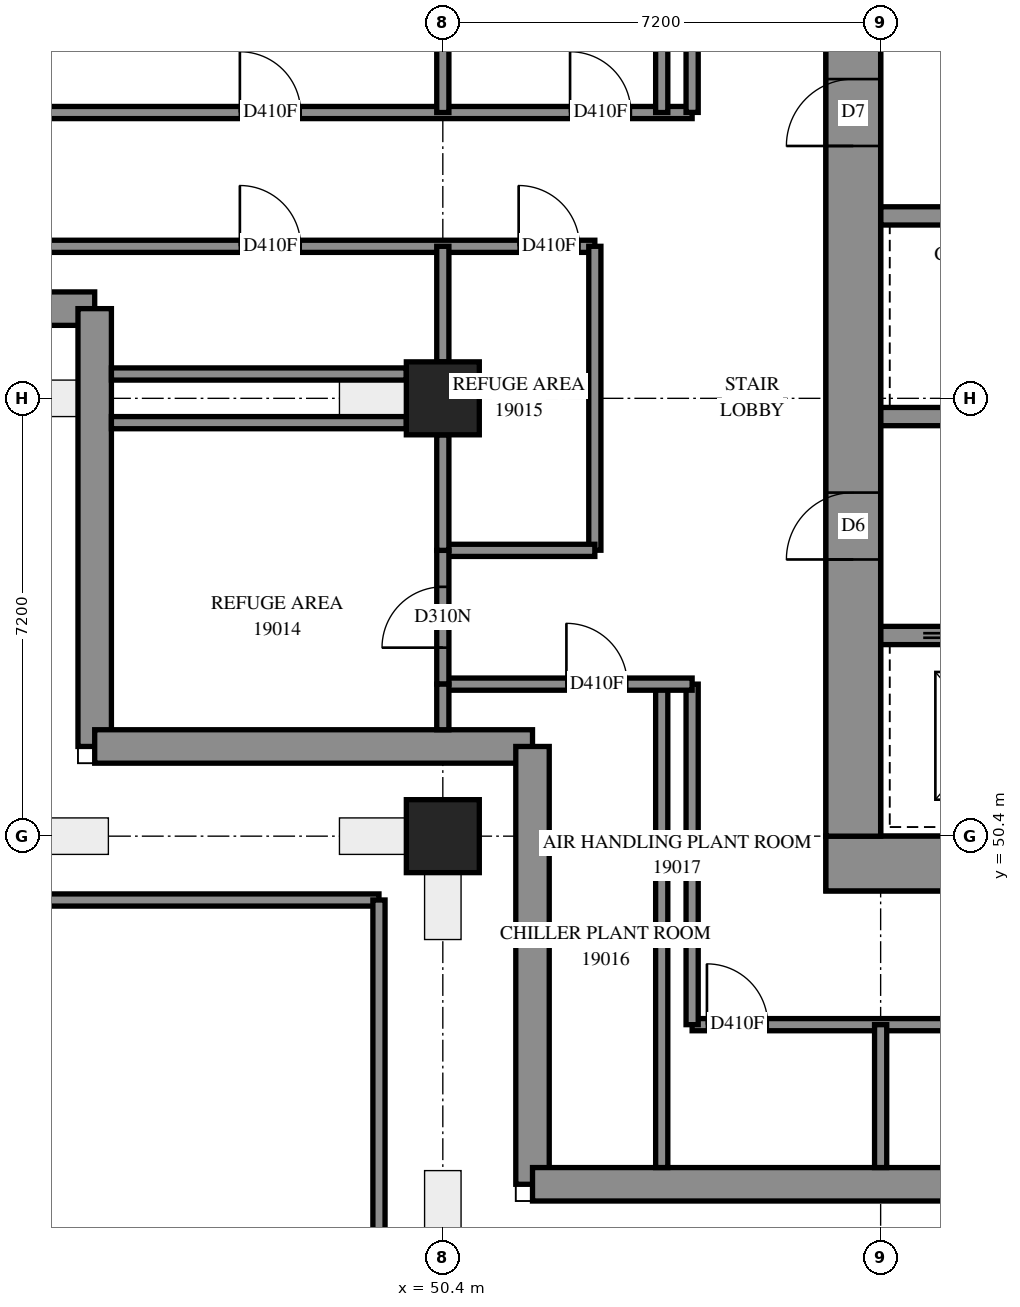
"""IFC4 building model, lengths in metres.
Left out: names, types, materials, properties, quantities, classifications, styles, units other than length and angle.
Written with IfcOpenShell. Run it as: python <this file> out.ifc"""

import sys

from ifc_helpers import new_model, si_unit, direction, frame, frame_2d, origin, origin_2d, place, context, subcontext, project, spatial, polyline, rectangle, outline, extrude, element, fill, save


model = new_model("IFC4")
c1 = context("Model", 3, precision=1e-05, world=origin(), true_north=direction((0.0, 1.0)))
c2 = subcontext(c1, "Body", "Model", "MODEL_VIEW")
j1 = project(units=[si_unit("LENGTHUNIT", "METRE"), si_unit("PLANEANGLEUNIT", "RADIAN")], contexts=[c1])
p1 = place(None, origin())
s1 = spatial("IfcSite", under=j1, at=p1, CompositionType="ELEMENT")
p2 = place(p1, origin())
s2 = spatial("IfcBuilding", under=s1, at=p2, CompositionType="ELEMENT")
p3 = place(p2, frame((0.0, 0.0, 72.0)))
s3 = spatial("IfcBuildingStorey", under=s2, at=p3, CompositionType="ELEMENT", Elevation=72.0)
p4 = place(p3, frame((50.4, 50.4, -0.3), z_axis=(0.0, 0.0, 1.0), x_axis=(1.0, 0.0, 0.0)))
e1 = element("IfcColumn", 1, at=p4, inside=s3, PredefinedType="COLUMN", context=c2, shape_type="SweptSolid", body=[
    extrude(rectangle(XDim=1.2, YDim=1.2, at=origin_2d()), origin(), (0.0, 0.0, 1.0), 5.0),
])
p5 = place(p3, frame((50.4, 57.6, 0.0), z_axis=(0.0, 0.0, 1.0), x_axis=(1.0, 0.0, 0.0)))
e2 = element("IfcColumn", 2, at=p5, inside=s3, PredefinedType="COLUMN", context=c2, shape_type="SweptSolid", body=[
    extrude(rectangle(XDim=1.2, YDim=1.2, at=origin_2d()), origin(), (0.0, 0.0, 1.0), 4.7),
])
p6 = place(p3, frame((56.7, 49.95, -0.3), z_axis=(0.0, 0.0, 1.0), x_axis=(1.0, 0.0, 0.0)))
e3 = element("IfcWall", 3, at=p6, inside=s3, PredefinedType="SHEAR", context=c2, shape_type="SweptSolid", body=[
    extrude(rectangle(XDim=16.2, YDim=0.9, at=frame_2d((8.1, 0.0))), origin(), (0.0, 0.0, 1.0), 4.3),
])
p7 = place(p3, frame((57.15, 50.4, -0.3), z_axis=(0.0, 0.0, 1.0), x_axis=(0.0, 1.0, 0.0)))
e4 = element("IfcWall", 4, at=p7, inside=s3, PredefinedType="SHEAR", context=c2, shape_type="SweptSolid", body=[
    extrude(rectangle(XDim=14.4, YDim=0.9, at=frame_2d((7.2, 0.0))), origin(), (0.0, 0.0, 1.0), 4.3),
])
p8 = place(p7, frame((4.55, 0.0, 0.3)))
e5 = element("IfcOpeningElement", 5, at=p8, cuts=e4, PredefinedType="OPENING", context=c2, shape_type="SweptSolid", body=[
    extrude(rectangle(XDim=1.1, YDim=2.1, at=frame_2d((0.55, 1.05))), frame((0.0, 0.46, 0.0), z_axis=(0.0, -1.0, 0.0), x_axis=(1.0, 0.0, 0.0)), (0.0, 0.0, 1.0), 0.92),
])
p9 = place(p7, frame((11.35, 0.0, 0.3)))
e6 = element("IfcOpeningElement", 6, at=p9, cuts=e4, PredefinedType="OPENING", context=c2, shape_type="SweptSolid", body=[
    extrude(rectangle(XDim=1.1, YDim=2.1, at=frame_2d((0.55, 1.05))), frame((0.0, 0.46, 0.0), z_axis=(0.0, -1.0, 0.0), x_axis=(1.0, 0.0, 0.0)), (0.0, 0.0, 1.0), 0.92),
])
p10 = place(p3, frame((57.6, 53.7, 0.0), z_axis=(0.0, 0.0, 1.0), x_axis=(1.0, 0.0, 0.0)))
e7 = element("IfcWall", 7, at=p10, inside=s3, PredefinedType="SOLIDWALL", context=c2, shape_type="SweptSolid", body=[
    extrude(rectangle(XDim=14.4, YDim=0.3, at=frame_2d((7.2, 0.0))), origin(), (0.0, 0.0, 1.0), 4.7),
])
p11 = place(p10, frame((1.25, 0.0, 0.0)))
e8 = element("IfcOpeningElement", 8, at=p11, cuts=e7, PredefinedType="OPENING", context=c2, shape_type="SweptSolid", body=[
    extrude(rectangle(XDim=1.1, YDim=2.1, at=frame_2d((0.55, 1.05))), frame((0.0, 0.16, 0.0), z_axis=(0.0, -1.0, 0.0), x_axis=(1.0, 0.0, 0.0)), (0.0, 0.0, 1.0), 0.32),
])
p12 = place(p10, frame((4.85, 0.0, 0.0)))
e9 = element("IfcOpeningElement", 9, at=p12, cuts=e7, PredefinedType="OPENING", context=c2, shape_type="SweptSolid", body=[
    extrude(rectangle(XDim=1.1, YDim=2.1, at=frame_2d((0.55, 1.05))), frame((0.0, 0.16, 0.0), z_axis=(0.0, -1.0, 0.0), x_axis=(1.0, 0.0, 0.0)), (0.0, 0.0, 1.0), 0.32),
])
p13 = place(p10, frame((8.45, 0.0, 0.0)))
e10 = element("IfcOpeningElement", 10, at=p13, cuts=e7, PredefinedType="OPENING", context=c2, shape_type="SweptSolid", body=[
    extrude(rectangle(XDim=1.1, YDim=2.1, at=frame_2d((0.55, 1.05))), frame((0.0, 0.16, 0.0), z_axis=(0.0, -1.0, 0.0), x_axis=(1.0, 0.0, 0.0)), (0.0, 0.0, 1.0), 0.32),
])
p14 = place(p10, frame((12.05, 0.0, 0.0)))
e11 = element("IfcOpeningElement", 11, at=p14, cuts=e7, PredefinedType="OPENING", context=c2, shape_type="SweptSolid", body=[
    extrude(rectangle(XDim=1.1, YDim=2.1, at=frame_2d((0.55, 1.05))), frame((0.0, 0.16, 0.0), z_axis=(0.0, -1.0, 0.0), x_axis=(1.0, 0.0, 0.0)), (0.0, 0.0, 1.0), 0.32),
])
p15 = place(p3, frame((57.6, 57.3, 0.0), z_axis=(0.0, 0.0, 1.0), x_axis=(1.0, 0.0, 0.0)))
e12 = element("IfcWall", 12, at=p15, inside=s3, PredefinedType="SOLIDWALL", context=c2, shape_type="SweptSolid", body=[
    extrude(rectangle(XDim=14.4, YDim=0.3, at=frame_2d((7.2, 0.0))), origin(), (0.0, 0.0, 1.0), 4.7),
])
p16 = place(p15, frame((12.05, 0.0, 0.0)))
e13 = element("IfcOpeningElement", 13, at=p16, cuts=e12, PredefinedType="OPENING", context=c2, shape_type="SweptSolid", body=[
    extrude(rectangle(XDim=1.1, YDim=2.1, at=frame_2d((0.55, 1.05))), frame((0.0, 0.16, 0.0), z_axis=(0.0, -1.0, 0.0), x_axis=(1.0, 0.0, 0.0)), (0.0, 0.0, 1.0), 0.32),
])
p17 = place(p3, frame((57.6, 60.6, 0.0), z_axis=(0.0, 0.0, 1.0), x_axis=(1.0, 0.0, 0.0)))
e14 = element("IfcWall", 14, at=p17, inside=s3, PredefinedType="SOLIDWALL", context=c2, shape_type="SweptSolid", body=[
    extrude(rectangle(XDim=7.2, YDim=0.3, at=frame_2d((3.6, 0.0))), origin(), (0.0, 0.0, 1.0), 4.7),
])
p18 = place(p3, frame((30.275, 59.075, 0.0), z_axis=(0.0, 0.0, 1.0), x_axis=(1.0, 0.0, 0.0)))
e15 = element("IfcWall", 15, at=p18, inside=s3, PredefinedType="SOLIDWALL", context=c2, shape_type="SweptSolid", body=[
    extrude(outline(polyline([(-0.275, -0.275), (14.125, -0.275), (14.675, 0.275), (0.275, 0.275), (-0.275, -0.275)])), origin(), (0.0, 0.0, 1.0), 4.7),
])
p19 = place(p3, frame((44.675, 59.075, 0.0), z_axis=(0.0, 0.0, 1.0), x_axis=(0.0, -1.0, 0.0)))
e16 = element("IfcWall", 16, at=p19, inside=s3, PredefinedType="SOLIDWALL", context=c2, shape_type="SweptSolid", body=[
    extrude(outline(polyline([(0.275, -0.275), (7.475, -0.275), (6.925, 0.275), (-0.275, 0.275), (0.275, -0.275)])), origin(), (0.0, 0.0, 1.0), 4.7),
])
p20 = place(p3, frame((44.675, 51.875, 0.0), z_axis=(0.0, 0.0, 1.0), x_axis=(1.0, 0.0, 0.0)))
e17 = element("IfcWall", 17, at=p20, inside=s3, PredefinedType="SOLIDWALL", context=c2, shape_type="SweptSolid", body=[
    extrude(outline(polyline([(-0.275, -0.275), (6.925, -0.275), (7.475, 0.275), (0.275, 0.275), (-0.275, -0.275)])), origin(), (0.0, 0.0, 1.0), 4.7),
])
p21 = place(p3, frame((51.875, 51.875, 0.0), z_axis=(0.0, 0.0, 1.0), x_axis=(0.0, -1.0, 0.0)))
e18 = element("IfcWall", 18, at=p21, inside=s3, PredefinedType="SOLIDWALL", context=c2, shape_type="SweptSolid", body=[
    extrude(outline(polyline([(0.275, -0.275), (7.475, -0.275), (6.925, 0.275), (-0.275, 0.275), (0.275, -0.275)])), origin(), (0.0, 0.0, 1.0), 4.7),
])
p22 = place(p3, frame((51.875, 44.675, 0.0), z_axis=(0.0, 0.0, 1.0), x_axis=(1.0, 0.0, 0.0)))
e19 = element("IfcWall", 19, at=p22, inside=s3, PredefinedType="SOLIDWALL", context=c2, shape_type="SweptSolid", body=[
    extrude(outline(polyline([(-0.275, -0.275), (26.075, -0.275), (26.303, 0.275), (0.275, 0.275), (-0.275, -0.275)])), origin(), (0.0, 0.0, 1.0), 4.7),
])
p23 = place(p22, frame((21.025, 0.0, 0.9)))
e20 = element("IfcOpeningElement", 20, at=p23, cuts=e19, PredefinedType="OPENING", context=c2, shape_type="SweptSolid", body=[
    extrude(rectangle(XDim=1.8, YDim=2.4, at=frame_2d((0.9, 1.2))), frame((0.0, 0.285, 0.0), z_axis=(0.0, -1.0, 0.0), x_axis=(1.0, 0.0, 0.0)), (0.0, 0.0, 1.0), 0.57),
])
p24 = place(p3, frame((42.15, 49.35, 0.0), z_axis=(0.0, 0.0, 1.0), x_axis=(1.0, 0.0, 0.0)))
e21 = element("IfcWall", 21, at=p24, inside=s3, PredefinedType="SOLIDWALL", context=c2, shape_type="SweptSolid", body=[
    extrude(outline(polyline([(-0.1, -0.1), (7.1, -0.1), (7.3, 0.1), (0.1, 0.1), (-0.1, -0.1)])), origin(), (0.0, 0.0, 1.0), 4.7),
])
p25 = place(p3, frame((49.35, 49.35, 0.0), z_axis=(0.0, 0.0, 1.0), x_axis=(0.0, -1.0, 0.0)))
e22 = element("IfcWall", 22, at=p25, inside=s3, PredefinedType="SOLIDWALL", context=c2, shape_type="SweptSolid", body=[
    extrude(outline(polyline([(0.1, -0.1), (7.3, -0.1), (7.1, 0.1), (-0.1, 0.1), (0.1, -0.1)])), origin(), (0.0, 0.0, 1.0), 4.7),
])
p26 = place(p3, frame((30.55, 60.1, 0.0), z_axis=(0.0, 0.0, 1.0), x_axis=(1.0, 0.0, 0.0)))
e23 = element("IfcWall", 23, at=p26, inside=s3, PredefinedType="PARTITIONING", context=c2, shape_type="SweptSolid", body=[
    extrude(rectangle(XDim=22.35, YDim=0.2, at=frame_2d((11.175, 0.0))), origin(), (0.0, 0.0, 1.0), 4.7),
])
p27 = place(p26, frame((16.512, 0.0, 0.0)))
e24 = element("IfcOpeningElement", 24, at=p27, cuts=e23, PredefinedType="OPENING", context=c2, shape_type="SweptSolid", body=[
    extrude(rectangle(XDim=1.0, YDim=2.1, at=frame_2d((0.5, 1.05))), frame((0.0, 0.11, 0.0), z_axis=(0.0, -1.0, 0.0), x_axis=(1.0, 0.0, 0.0)), (0.0, 0.0, 1.0), 0.22),
])
p28 = place(p26, frame((21.097, 0.0, 0.0)))
e25 = element("IfcOpeningElement", 25, at=p28, cuts=e23, PredefinedType="OPENING", context=c2, shape_type="SweptSolid", body=[
    extrude(rectangle(XDim=1.0, YDim=2.1, at=frame_2d((0.5, 1.05))), frame((0.0, 0.11, 0.0), z_axis=(0.0, -1.0, 0.0), x_axis=(1.0, 0.0, 0.0)), (0.0, 0.0, 1.0), 0.22),
])
p29 = place(p3, frame((33.502, 62.3, 0.0), z_axis=(0.0, 0.0, 1.0), x_axis=(1.0, 0.0, 0.0)))
e26 = element("IfcWall", 26, at=p29, inside=s3, PredefinedType="PARTITIONING", context=c2, shape_type="SweptSolid", body=[
    extrude(rectangle(XDim=20.998, YDim=0.2, at=frame_2d((10.499, 0.0))), origin(), (0.0, 0.0, 1.0), 4.7),
])
p30 = place(p29, frame((6.361, 0.0, 0.0)))
e27 = element("IfcOpeningElement", 27, at=p30, cuts=e26, PredefinedType="OPENING", context=c2, shape_type="SweptSolid", body=[
    extrude(rectangle(XDim=1.0, YDim=2.1, at=frame_2d((0.5, 1.05))), frame((0.0, 0.11, 0.0), z_axis=(0.0, -1.0, 0.0), x_axis=(1.0, 0.0, 0.0)), (0.0, 0.0, 1.0), 0.22),
])
p31 = place(p29, frame((13.56, 0.0, 0.0)))
e28 = element("IfcOpeningElement", 28, at=p31, cuts=e26, PredefinedType="OPENING", context=c2, shape_type="SweptSolid", body=[
    extrude(rectangle(XDim=1.0, YDim=2.1, at=frame_2d((0.5, 1.05))), frame((0.0, 0.11, 0.0), z_axis=(0.0, -1.0, 0.0), x_axis=(1.0, 0.0, 0.0)), (0.0, 0.0, 1.0), 0.22),
])
p32 = place(p29, frame((18.991, 0.0, 0.0)))
e29 = element("IfcOpeningElement", 29, at=p32, cuts=e26, PredefinedType="OPENING", context=c2, shape_type="SweptSolid", body=[
    extrude(rectangle(XDim=1.0, YDim=2.1, at=frame_2d((0.5, 1.05))), frame((0.0, 0.11, 0.0), z_axis=(0.0, -1.0, 0.0), x_axis=(1.0, 0.0, 0.0)), (0.0, 0.0, 1.0), 0.22),
])
p33 = place(p3, frame((54.5, 47.3, 0.0), z_axis=(0.0, 0.0, 1.0), x_axis=(1.0, 0.0, 0.0)))
e30 = element("IfcWall", 30, at=p33, inside=s3, PredefinedType="PARTITIONING", context=c2, shape_type="SweptSolid", body=[
    extrude(rectangle(XDim=19.56, YDim=0.2, at=frame_2d((9.78, 0.0))), origin(), (0.0, 0.0, 1.0), 4.7),
])
p34 = place(p33, frame((0.243, 0.0, 0.0)))
e31 = element("IfcOpeningElement", 31, at=p34, cuts=e30, PredefinedType="OPENING", context=c2, shape_type="SweptSolid", body=[
    extrude(rectangle(XDim=1.0, YDim=2.1, at=frame_2d((0.5, 1.05))), frame((0.0, 0.11, 0.0), z_axis=(0.0, -1.0, 0.0), x_axis=(1.0, 0.0, 0.0)), (0.0, 0.0, 1.0), 0.22),
])
p35 = place(p33, frame((12.457, 0.0, 0.0)))
e32 = element("IfcOpeningElement", 32, at=p35, cuts=e30, PredefinedType="OPENING", context=c2, shape_type="SweptSolid", body=[
    extrude(rectangle(XDim=1.0, YDim=2.1, at=frame_2d((0.5, 1.05))), frame((0.0, 0.11, 0.0), z_axis=(0.0, -1.0, 0.0), x_axis=(1.0, 0.0, 0.0)), (0.0, 0.0, 1.0), 0.22),
])
for number, where, z_axis, x_axis in (
    (33, (54.0, 44.95, 0.0), (0.0, 0.0, 1.0), (0.0, 1.0, 0.0)),
    (34, (54.0, 62.3, 0.0), (0.0, 0.0, 1.0), (0.0, 1.0, 0.0)),
):
    element("IfcWall", number, at=place(p3, frame(where, z_axis=z_axis, x_axis=x_axis)), inside=s3, PredefinedType="PARTITIONING", context=c2, shape_type="SweptSolid", body=[
        extrude(rectangle(XDim=7.95, YDim=0.2, at=frame_2d((3.975, 0.0))), origin(), (0.0, 0.0, 1.0), 4.7),
    ])
p36 = place(p3, frame((54.5, 47.3, 0.0), z_axis=(0.0, 0.0, 1.0), x_axis=(0.0, 1.0, 0.0)))
e35 = element("IfcWall", 35, at=p36, inside=s3, PredefinedType="PARTITIONING", context=c2, shape_type="SweptSolid", body=[
    extrude(rectangle(XDim=5.6, YDim=0.2, at=frame_2d((2.8, 0.0))), origin(), (0.0, 0.0, 1.0), 4.7),
])
p37 = place(p3, frame((54.5, 62.302, 0.0), z_axis=(0.0, 0.0, 1.0), x_axis=(0.0, 1.0, 0.0)))
e36 = element("IfcWall", 36, at=p37, inside=s3, PredefinedType="PARTITIONING", context=c2, shape_type="SweptSolid", body=[
    extrude(rectangle(XDim=5.598, YDim=0.2, at=frame_2d((2.799, 0.0))), origin(), (0.0, 0.0, 1.0), 4.7),
])
p38 = place(p3, frame((52.9, 55.102, 0.0), z_axis=(0.0, 0.0, 1.0), x_axis=(0.0, 1.0, 0.0)))
e37 = element("IfcWall", 37, at=p38, inside=s3, PredefinedType="PARTITIONING", context=c2, shape_type="SweptSolid", body=[
    extrude(rectangle(XDim=4.998, YDim=0.2, at=frame_2d((2.499, 0.0))), origin(), (0.0, 0.0, 1.0), 4.7),
])
for number, where, z_axis, x_axis in (
    (38, (44.95, 57.2, 0.0), (0.0, 0.0, 1.0), (1.0, 0.0, 0.0)),
    (39, (44.95, 58.0, 0.0), (0.0, 0.0, 1.0), (1.0, 0.0, 0.0)),
):
    element("IfcWall", number, at=place(p3, frame(where, z_axis=z_axis, x_axis=x_axis)), inside=s3, PredefinedType="PARTITIONING", context=c2, shape_type="SweptSolid", body=[
        extrude(rectangle(XDim=4.85, YDim=0.2, at=frame_2d((2.425, 0.0))), origin(), (0.0, 0.0, 1.0), 4.7),
    ])
p39 = place(p3, frame((50.4, 52.9, 0.0), z_axis=(0.0, 0.0, 1.0), x_axis=(1.0, 0.0, 0.0)))
e40 = element("IfcWall", 40, at=p39, inside=s3, PredefinedType="PARTITIONING", context=c2, shape_type="SweptSolid", body=[
    extrude(rectangle(XDim=4.1, YDim=0.2, at=frame_2d((2.05, 0.0))), origin(), (0.0, 0.0, 1.0), 4.7),
])
p40 = place(p39, frame((2.033, 0.0, 0.0)))
e41 = element("IfcOpeningElement", 41, at=p40, cuts=e40, PredefinedType="OPENING", context=c2, shape_type="SweptSolid", body=[
    extrude(rectangle(XDim=1.0, YDim=2.1, at=frame_2d((0.5, 1.05))), frame((0.0, 0.11, 0.0), z_axis=(0.0, -1.0, 0.0), x_axis=(1.0, 0.0, 0.0)), (0.0, 0.0, 1.0), 0.22),
])
p41 = place(p3, frame((50.4, 55.1, 0.0), z_axis=(0.0, 0.0, 1.0), x_axis=(1.0, 0.0, 0.0)))
e42 = element("IfcWall", 42, at=p41, inside=s3, PredefinedType="PARTITIONING", context=c2, shape_type="SweptSolid", body=[
    extrude(rectangle(XDim=2.5, YDim=0.2, at=frame_2d((1.25, 0.0))), origin(), (0.0, 0.0, 1.0), 4.7),
])
p42 = place(p3, frame((57.6, 44.95, 0.0), z_axis=(0.0, 0.0, 1.0), x_axis=(0.0, 1.0, 0.0)))
e43 = element("IfcWall", 43, at=p42, inside=s3, PredefinedType="PARTITIONING", context=c2, shape_type="SweptSolid", body=[
    extrude(rectangle(XDim=2.35, YDim=0.2, at=frame_2d((1.175, 0.0))), origin(), (0.0, 0.0, 1.0), 4.7),
])
p43 = place(p3, frame((50.4, 52.9, 0.0), z_axis=(0.0, 0.0, 1.0), x_axis=(0.0, 1.0, 0.0)))
e44 = element("IfcWall", 44, at=p43, inside=s3, PredefinedType="PARTITIONING", context=c2, shape_type="SweptSolid", body=[
    extrude(rectangle(XDim=2.2, YDim=0.2, at=frame_2d((1.1, 0.0))), origin(), (0.0, 0.0, 1.0), 4.7),
])
p44 = place(p43, frame((0.6, 0.0, 0.0)))
e45 = element("IfcOpeningElement", 45, at=p44, cuts=e44, PredefinedType="OPENING", context=c2, shape_type="SweptSolid", body=[
    extrude(rectangle(XDim=1.0, YDim=2.1, at=frame_2d((0.5, 1.05))), frame((0.0, 0.11, 0.0), z_axis=(0.0, -1.0, 0.0), x_axis=(1.0, 0.0, 0.0)), (0.0, 0.0, 1.0), 0.22),
])
for number, where, z_axis, x_axis in (
    (46, (50.4, 62.3, 0.0), (0.0, 0.0, 1.0), (0.0, 1.0, 0.0)),
    (47, (50.4, 55.1, 0.0), (0.0, 0.0, 1.0), (0.0, 1.0, 0.0)),
    (48, (50.4, 58.2, 0.0), (0.0, 0.0, 1.0), (0.0, 1.0, 0.0)),
):
    element("IfcWall", number, at=place(p3, frame(where, z_axis=z_axis, x_axis=x_axis)), inside=s3, PredefinedType="PARTITIONING", context=c2, shape_type="SweptSolid", body=[
        extrude(rectangle(XDim=1.9, YDim=0.2, at=frame_2d((0.95, 0.0))), origin(), (0.0, 0.0, 1.0), 4.7),
    ])
p45 = place(p3, frame((50.4, 52.15, 0.0), z_axis=(0.0, 0.0, 1.0), x_axis=(0.0, 1.0, 0.0)))
e49 = element("IfcWall", 49, at=p45, inside=s3, PredefinedType="PARTITIONING", context=c2, shape_type="SweptSolid", body=[
    extrude(rectangle(XDim=0.75, YDim=0.2, at=frame_2d((0.375, 0.0))), origin(), (0.0, 0.0, 1.0), 4.7),
])
p46 = place(p8, origin())
e50 = element("IfcDoor", 50, at=p46, inside=s3, OperationType="DOUBLE_DOOR_SINGLE_SWING", PredefinedType="DOOR", context=c2, shape_type="SweptSolid", body=[
    extrude(rectangle(XDim=1.1, YDim=2.1, at=frame_2d((0.55, 1.05))), frame((0.0, 0.025, 0.0), z_axis=(0.0, -1.0, 0.0), x_axis=(1.0, 0.0, 0.0)), (0.0, 0.0, 1.0), 0.05),
])
fill(e5, e50)
p47 = place(p9, origin())
e51 = element("IfcDoor", 51, at=p47, inside=s3, OperationType="SINGLE_SWING_LEFT", PredefinedType="DOOR", context=c2, shape_type="SweptSolid", body=[
    extrude(rectangle(XDim=1.1, YDim=2.1, at=frame_2d((0.55, 1.05))), frame((0.0, 0.025, 0.0), z_axis=(0.0, -1.0, 0.0), x_axis=(1.0, 0.0, 0.0)), (0.0, 0.0, 1.0), 0.05),
])
fill(e6, e51)
p48 = place(p27, origin())
e52 = element("IfcDoor", 52, at=p48, inside=s3, OperationType="SINGLE_SWING_LEFT", PredefinedType="DOOR", context=c2, shape_type="SweptSolid", body=[
    extrude(rectangle(XDim=1.0, YDim=2.1, at=frame_2d((0.5, 1.05))), frame((0.0, 0.025, 0.0), z_axis=(0.0, -1.0, 0.0), x_axis=(1.0, 0.0, 0.0)), (0.0, 0.0, 1.0), 0.05),
])
fill(e24, e52)
p49 = place(p28, origin())
e53 = element("IfcDoor", 53, at=p49, inside=s3, OperationType="SINGLE_SWING_LEFT", PredefinedType="DOOR", context=c2, shape_type="SweptSolid", body=[
    extrude(rectangle(XDim=1.0, YDim=2.1, at=frame_2d((0.5, 1.05))), frame((0.0, 0.025, 0.0), z_axis=(0.0, -1.0, 0.0), x_axis=(1.0, 0.0, 0.0)), (0.0, 0.0, 1.0), 0.05),
])
fill(e25, e53)
p50 = place(p40, origin())
e54 = element("IfcDoor", 54, at=p50, inside=s3, OperationType="SINGLE_SWING_LEFT", PredefinedType="DOOR", context=c2, shape_type="SweptSolid", body=[
    extrude(rectangle(XDim=1.0, YDim=2.1, at=frame_2d((0.5, 1.05))), frame((0.0, 0.025, 0.0), z_axis=(0.0, -1.0, 0.0), x_axis=(1.0, 0.0, 0.0)), (0.0, 0.0, 1.0), 0.05),
])
fill(e41, e54)
p51 = place(p34, origin())
e55 = element("IfcDoor", 55, at=p51, inside=s3, OperationType="SINGLE_SWING_RIGHT", PredefinedType="DOOR", context=c2, shape_type="SweptSolid", body=[
    extrude(rectangle(XDim=1.0, YDim=2.1, at=frame_2d((0.5, 1.05))), frame((0.0, 0.025, 0.0), z_axis=(0.0, -1.0, 0.0), x_axis=(1.0, 0.0, 0.0)), (0.0, 0.0, 1.0), 0.05),
])
fill(e31, e55)
p52 = place(p31, origin())
e56 = element("IfcDoor", 56, at=p52, inside=s3, OperationType="SINGLE_SWING_RIGHT", PredefinedType="DOOR", context=c2, shape_type="SweptSolid", body=[
    extrude(rectangle(XDim=1.0, YDim=2.1, at=frame_2d((0.5, 1.05))), frame((0.0, 0.025, 0.0), z_axis=(0.0, -1.0, 0.0), x_axis=(1.0, 0.0, 0.0)), (0.0, 0.0, 1.0), 0.05),
])
fill(e28, e56)
p53 = place(p32, origin())
e57 = element("IfcDoor", 57, at=p53, inside=s3, OperationType="SINGLE_SWING_RIGHT", PredefinedType="DOOR", context=c2, shape_type="SweptSolid", body=[
    extrude(rectangle(XDim=1.0, YDim=2.1, at=frame_2d((0.5, 1.05))), frame((0.0, 0.025, 0.0), z_axis=(0.0, -1.0, 0.0), x_axis=(1.0, 0.0, 0.0)), (0.0, 0.0, 1.0), 0.05),
])
fill(e29, e57)
p54 = place(p44, origin())
e58 = element("IfcDoor", 58, at=p54, inside=s3, OperationType="SINGLE_SWING_LEFT", PredefinedType="DOOR", context=c2, shape_type="SweptSolid", body=[
    extrude(rectangle(XDim=1.0, YDim=2.1, at=frame_2d((0.5, 1.05))), frame((0.0, 0.025, 0.0), z_axis=(0.0, -1.0, 0.0), x_axis=(1.0, 0.0, 0.0)), (0.0, 0.0, 1.0), 0.05),
])
fill(e45, e58)
save(model, sys.argv[1])
